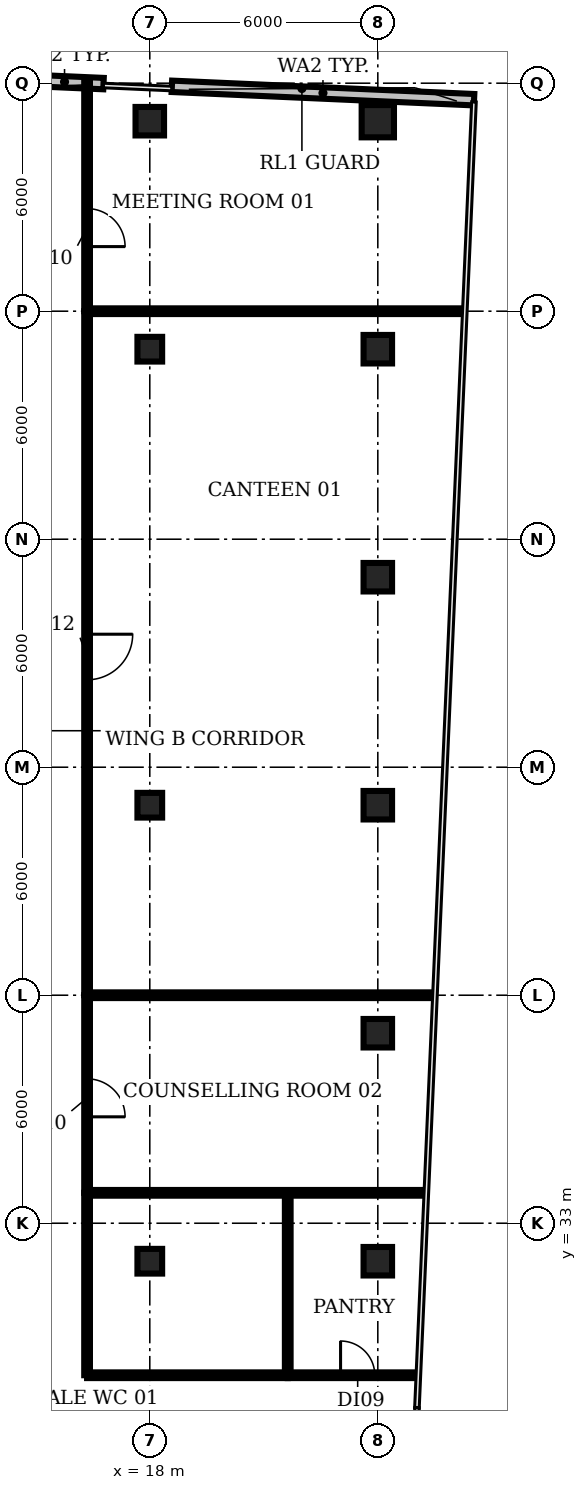
"""IFC4 building model, lengths in metres.
Left out: names, types, materials, properties, quantities, classifications, styles, units other than length and angle.
Written with IfcOpenShell. Run it as: python <this file> out.ifc"""

import sys

from ifc_helpers import new_model, si_unit, direction, frame, frame_2d, origin, origin_2d, place, context, subcontext, project, spatial, rectangle, circle, extrude, element, fill, save


model = new_model("IFC4")
c1 = context("Model", 3, precision=1e-05, world=origin(), true_north=direction((0.0, 1.0)))
c2 = subcontext(c1, "Body", "Model", "MODEL_VIEW")
j1 = project(units=[si_unit("LENGTHUNIT", "METRE"), si_unit("PLANEANGLEUNIT", "RADIAN")], contexts=[c1])
p1 = place(None, origin())
s1 = spatial("IfcSite", under=j1, at=p1, CompositionType="ELEMENT")
p2 = place(p1, origin())
s2 = spatial("IfcBuilding", under=s1, at=p2, CompositionType="ELEMENT")
p3 = place(p2, frame((0.0, 0.0, 276.8)))
s3 = spatial("IfcBuildingStorey", under=s2, at=p3, CompositionType="ELEMENT", Elevation=276.8)
for number, where, z_axis, x_axis in (
    (1, (18.0, 32.0, 0.0), (0.0, 0.0, 1.0), (1.0, 0.0, 0.0)),
    (2, (18.0, 44.0, 0.0), (0.0, 0.0, 1.0), (1.0, 0.0, 0.0)),
    (3, (18.0, 56.0, 0.0), (0.0, 0.0, 1.0), (1.0, 0.0, 0.0)),
):
    element("IfcColumn", number, at=place(p3, frame(where, z_axis=z_axis, x_axis=x_axis)), inside=s3, PredefinedType="COLUMN", context=c2, shape_type="SweptSolid", body=[
        extrude(rectangle(XDim=0.65, YDim=0.65, at=origin_2d()), origin(), (0.0, 0.0, 1.0), 3.85),
    ])
for number, where, z_axis, x_axis in (
    (4, (18.0, 62.0, 0.0), (0.0, 0.0, 1.0), (1.0, 0.0, 0.0)),
    (5, (24.0, 32.0, 0.0), (0.0, 0.0, 1.0), (1.0, 0.0, 0.0)),
    (6, (24.0, 38.0, 0.0), (0.0, 0.0, 1.0), (1.0, 0.0, 0.0)),
    (7, (24.0, 44.0, 0.0), (0.0, 0.0, 1.0), (1.0, 0.0, 0.0)),
    (8, (24.0, 50.0, 0.0), (0.0, 0.0, 1.0), (1.0, 0.0, 0.0)),
    (9, (24.0, 56.0, 0.0), (0.0, 0.0, 1.0), (1.0, 0.0, 0.0)),
):
    element("IfcColumn", number, at=place(p3, frame(where, z_axis=z_axis, x_axis=x_axis)), inside=s3, PredefinedType="COLUMN", context=c2, shape_type="SweptSolid", body=[
        extrude(rectangle(XDim=0.75, YDim=0.75, at=origin_2d()), origin(), (0.0, 0.0, 1.0), 3.85),
    ])
p4 = place(p3, frame((24.0, 62.0, 0.0), z_axis=(0.0, 0.0, 1.0), x_axis=(1.0, 0.0, 0.0)))
e10 = element("IfcColumn", 10, at=p4, inside=s3, PredefinedType="COLUMN", context=c2, shape_type="SweptSolid", body=[
    extrude(circle(Radius=0.425, at=origin_2d()), origin(), (0.0, 0.0, 1.0), 3.85),
])
p5 = place(p3, frame((26.533, 62.566, 0.0), z_axis=(0.0, 0.0, 1.0), x_axis=(-0.999020054915, 0.044259799799, 0.0)))
e11 = element("IfcWall", 11, at=p5, inside=s3, PredefinedType="SOLIDWALL", context=c2, shape_type="SweptSolid", body=[
    extrude(rectangle(XDim=7.96, YDim=0.3, at=frame_2d((3.98, 0.0))), origin(), (0.0, 0.0, 1.0), 3.85),
])
p6 = place(p3, frame((16.782, 62.989, 0.0), z_axis=(0.0, 0.0, 1.0), x_axis=(-0.999021060555, 0.044237094932, 0.0)))
e12 = element("IfcWall", 12, at=p6, inside=s3, PredefinedType="SOLIDWALL", context=c2, shape_type="SweptSolid", body=[
    extrude(rectangle(XDim=2.053, YDim=0.3, at=frame_2d((1.026, 0.0))), origin(), (0.0, 0.0, 1.0), 3.85),
])
p7 = place(p3, frame((16.35, 29.0, 0.0), z_axis=(0.0, 0.0, 1.0), x_axis=(0.0, 1.0, 0.0)))
e13 = element("IfcWall", 13, at=p7, inside=s3, PredefinedType="PARTITIONING", context=c2, shape_type="SweptSolid", body=[
    extrude(rectangle(XDim=4.8, YDim=0.15, at=frame_2d((2.4, 0.0))), origin(), (0.0, 0.0, 1.0), 2.9),
])
p8 = place(p3, frame((16.35, 29.0, 0.0), z_axis=(0.0, 0.0, 1.0), x_axis=(1.0, 0.0, 0.0)))
e14 = element("IfcWall", 14, at=p8, inside=s3, PredefinedType="PARTITIONING", context=c2, shape_type="SweptSolid", body=[
    extrude(rectangle(XDim=5.28, YDim=0.15, at=frame_2d((2.64, 0.0))), origin(), (0.0, 0.0, 1.0), 2.9),
])
p9 = place(p3, frame((16.35, 33.8, 0.0), z_axis=(0.0, 0.0, 1.0), x_axis=(1.0, 0.0, 0.0)))
e15 = element("IfcWall", 15, at=p9, inside=s3, PredefinedType="PARTITIONING", context=c2, shape_type="SweptSolid", body=[
    extrude(rectangle(XDim=8.865, YDim=0.15, at=frame_2d((4.433, 0.0))), origin(), (0.0, 0.0, 1.0), 2.9),
])
p10 = place(p3, frame((16.35, 39.0, 0.0), z_axis=(0.0, 0.0, 1.0), x_axis=(0.0, -1.0, 0.0)))
e16 = element("IfcWall", 16, at=p10, inside=s3, PredefinedType="PARTITIONING", context=c2, shape_type="SweptSolid", body=[
    extrude(rectangle(XDim=5.2, YDim=0.15, at=frame_2d((2.6, 0.0))), origin(), (0.0, 0.0, 1.0), 2.9),
])
p11 = place(p10, frame((2.2, 0.0, 0.0)))
e17 = element("IfcOpeningElement", 17, at=p11, cuts=e16, PredefinedType="OPENING", context=c2, shape_type="SweptSolid", body=[
    extrude(rectangle(XDim=1.0, YDim=2.1, at=frame_2d((0.5, 1.05))), frame((0.0, 0.085, 0.0), z_axis=(0.0, -1.0, 0.0), x_axis=(1.0, 0.0, 0.0)), (0.0, 0.0, 1.0), 0.17),
])
p12 = place(p3, frame((16.35, 39.0, 0.0), z_axis=(0.0, 0.0, 1.0), x_axis=(1.0, 0.0, 0.0)))
e18 = element("IfcWall", 18, at=p12, inside=s3, PredefinedType="PARTITIONING", context=c2, shape_type="SweptSolid", body=[
    extrude(rectangle(XDim=9.1, YDim=0.15, at=frame_2d((4.55, 0.0))), origin(), (0.0, 0.0, 1.0), 2.9),
])
p13 = place(p3, frame((16.35, 57.0, 0.0), z_axis=(0.0, 0.0, 1.0), x_axis=(0.0, -1.0, 0.0)))
e19 = element("IfcWall", 19, at=p13, inside=s3, PredefinedType="PARTITIONING", context=c2, shape_type="SweptSolid", body=[
    extrude(rectangle(XDim=18.0, YDim=0.15, at=frame_2d((9.0, 0.0))), origin(), (0.0, 0.0, 1.0), 2.9),
])
p14 = place(p13, frame((8.5, 0.0, 0.0)))
e20 = element("IfcOpeningElement", 20, at=p14, cuts=e19, PredefinedType="OPENING", context=c2, shape_type="SweptSolid", body=[
    extrude(rectangle(XDim=1.2, YDim=2.1, at=frame_2d((0.6, 1.05))), frame((0.0, 0.085, 0.0), z_axis=(0.0, -1.0, 0.0), x_axis=(1.0, 0.0, 0.0)), (0.0, 0.0, 1.0), 0.17),
])
p15 = place(p3, frame((16.35, 57.0, 0.0), z_axis=(0.0, 0.0, 1.0), x_axis=(1.0, 0.0, 0.0)))
e21 = element("IfcWall", 21, at=p15, inside=s3, PredefinedType="PARTITIONING", context=c2, shape_type="SweptSolid", body=[
    extrude(rectangle(XDim=9.89, YDim=0.15, at=frame_2d((4.945, 0.0))), origin(), (0.0, 0.0, 1.0), 2.9),
])
p16 = place(p3, frame((16.35, 63.018, 0.0), z_axis=(0.0, 0.0, 1.0), x_axis=(0.0, -1.0, 0.0)))
e22 = element("IfcWall", 22, at=p16, inside=s3, PredefinedType="PARTITIONING", context=c2, shape_type="SweptSolid", body=[
    extrude(rectangle(XDim=6.018, YDim=0.15, at=frame_2d((3.009, 0.0))), origin(), (0.0, 0.0, 1.0), 2.9),
])
p17 = place(p16, frame((3.318, 0.0, 0.0)))
e23 = element("IfcOpeningElement", 23, at=p17, cuts=e22, PredefinedType="OPENING", context=c2, shape_type="SweptSolid", body=[
    extrude(rectangle(XDim=1.0, YDim=2.1, at=frame_2d((0.5, 1.05))), frame((0.0, 0.085, 0.0), z_axis=(0.0, -1.0, 0.0), x_axis=(1.0, 0.0, 0.0)), (0.0, 0.0, 1.0), 0.17),
])
p18 = place(p3, frame((21.63, 29.0, 0.0), z_axis=(0.0, 0.0, 1.0), x_axis=(0.0, 1.0, 0.0)))
e24 = element("IfcWall", 24, at=p18, inside=s3, PredefinedType="PARTITIONING", context=c2, shape_type="SweptSolid", body=[
    extrude(rectangle(XDim=4.8, YDim=0.15, at=frame_2d((2.4, 0.0))), origin(), (0.0, 0.0, 1.0), 2.9),
])
p19 = place(p3, frame((21.63, 29.0, 0.0), z_axis=(0.0, 0.0, 1.0), x_axis=(1.0, 0.0, 0.0)))
e25 = element("IfcWall", 25, at=p19, inside=s3, PredefinedType="PARTITIONING", context=c2, shape_type="SweptSolid", body=[
    extrude(rectangle(XDim=3.39, YDim=0.15, at=frame_2d((1.695, 0.0))), origin(), (0.0, 0.0, 1.0), 2.9),
])
p20 = place(p19, frame((1.39, 0.0, 0.0)))
e26 = element("IfcOpeningElement", 26, at=p20, cuts=e25, PredefinedType="OPENING", context=c2, shape_type="SweptSolid", body=[
    extrude(rectangle(XDim=0.9, YDim=2.1, at=frame_2d((0.45, 1.05))), frame((0.0, 0.085, 0.0), z_axis=(0.0, -1.0, 0.0), x_axis=(1.0, 0.0, 0.0)), (0.0, 0.0, 1.0), 0.17),
])
p21 = place(p11, origin())
e27 = element("IfcDoor", 27, at=p21, inside=s3, OperationType="SINGLE_SWING_RIGHT", PredefinedType="DOOR", context=c2, shape_type="SweptSolid", body=[
    extrude(rectangle(XDim=1.0, YDim=2.1, at=frame_2d((0.5, 1.05))), frame((0.0, 0.025, 0.0), z_axis=(0.0, -1.0, 0.0), x_axis=(1.0, 0.0, 0.0)), (0.0, 0.0, 1.0), 0.05),
])
fill(e17, e27)
p22 = place(p14, origin())
e28 = element("IfcDoor", 28, at=p22, inside=s3, OperationType="SINGLE_SWING_LEFT", PredefinedType="DOOR", context=c2, shape_type="SweptSolid", body=[
    extrude(rectangle(XDim=1.2, YDim=2.1, at=frame_2d((0.6, 1.05))), frame((0.0, 0.025, 0.0), z_axis=(0.0, -1.0, 0.0), x_axis=(1.0, 0.0, 0.0)), (0.0, 0.0, 1.0), 0.05),
])
fill(e20, e28)
p23 = place(p17, origin())
e29 = element("IfcDoor", 29, at=p23, inside=s3, OperationType="SINGLE_SWING_RIGHT", PredefinedType="DOOR", context=c2, shape_type="SweptSolid", body=[
    extrude(rectangle(XDim=1.0, YDim=2.1, at=frame_2d((0.5, 1.05))), frame((0.0, 0.025, 0.0), z_axis=(0.0, -1.0, 0.0), x_axis=(1.0, 0.0, 0.0)), (0.0, 0.0, 1.0), 0.05),
])
fill(e23, e29)
p24 = place(p20, origin())
e30 = element("IfcDoor", 30, at=p24, inside=s3, OperationType="SINGLE_SWING_LEFT", PredefinedType="DOOR", context=c2, shape_type="SweptSolid", body=[
    extrude(rectangle(XDim=0.9, YDim=2.1, at=frame_2d((0.45, 1.05))), frame((0.0, 0.025, 0.0), z_axis=(0.0, -1.0, 0.0), x_axis=(1.0, 0.0, 0.0)), (0.0, 0.0, 1.0), 0.05),
])
fill(e26, e30)
save(model, sys.argv[1])
